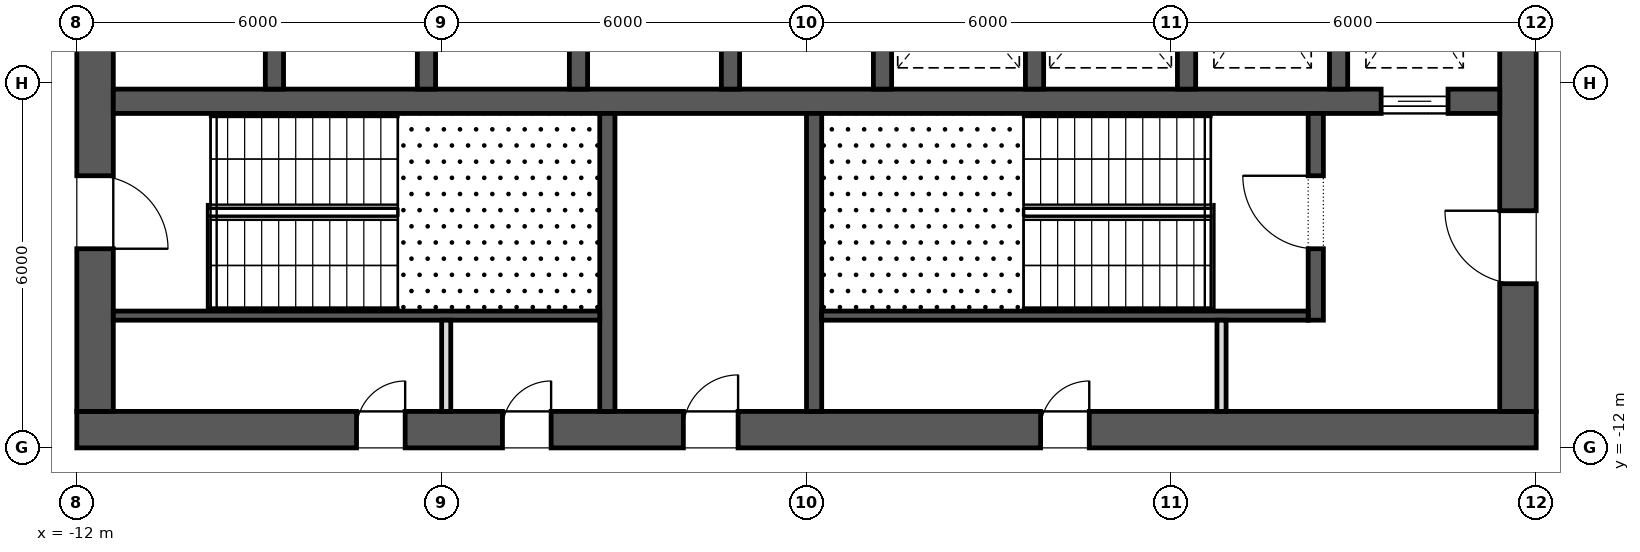
"""IFC4 building model, lengths in metres.
Left out: names, types, materials, properties, quantities, classifications, styles, units other than length and angle.
Written with IfcOpenShell. Run it as: python <this file> out.ifc"""

import sys

from ifc_helpers import new_model, si_unit, direction, frame, frame_2d, origin, place, context, subcontext, project, spatial, rectangle, extrude, element, fill, save


model = new_model("IFC4")
c1 = context("Model", 3, precision=1e-05, world=origin(), true_north=direction((0.0, 1.0)))
c2 = subcontext(c1, "Body", "Model", "MODEL_VIEW")
j1 = project(units=[si_unit("LENGTHUNIT", "METRE"), si_unit("PLANEANGLEUNIT", "RADIAN")], contexts=[c1])
p1 = place(None, origin())
s1 = spatial("IfcSite", under=j1, at=p1, CompositionType="ELEMENT")
p2 = place(p1, origin())
s2 = spatial("IfcBuilding", under=s1, at=p2, CompositionType="ELEMENT")
p3 = place(p2, frame((0.0, 0.0, 112.9)))
s3 = spatial("IfcBuildingStorey", under=s2, at=p3, CompositionType="ELEMENT", Elevation=112.9)
p4 = place(p3, frame((-12.0, -11.7, 0.0), z_axis=(0.0, 0.0, 1.0), x_axis=(1.0, 0.0, 0.0)))
e1 = element("IfcWall", 1, at=p4, inside=s3, PredefinedType="SHEAR", context=c2, shape_type="SweptSolid", body=[
    extrude(rectangle(XDim=24.0, YDim=0.6, at=frame_2d((12.0, 0.0))), origin(), (0.0, 0.0, 1.0), 4.2),
])
p5 = place(p4, frame((9.975, 0.0, 0.0)))
e2 = element("IfcOpeningElement", 2, at=p5, cuts=e1, PredefinedType="OPENING", context=c2, shape_type="SweptSolid", body=[
    extrude(rectangle(XDim=0.9, YDim=2.1, at=frame_2d((0.45, 1.05))), frame((0.0, 0.312, 0.0), z_axis=(0.0, -1.0, 0.0), x_axis=(1.0, 0.0, 0.0)), (0.0, 0.0, 1.0), 0.624),
])
p6 = place(p4, frame((4.6, 0.0, 0.0)))
e3 = element("IfcOpeningElement", 3, at=p6, cuts=e1, PredefinedType="OPENING", context=c2, shape_type="SweptSolid", body=[
    extrude(rectangle(XDim=0.8, YDim=2.1, at=frame_2d((0.4, 1.05))), frame((0.0, 0.312, 0.0), z_axis=(0.0, -1.0, 0.0), x_axis=(1.0, 0.0, 0.0)), (0.0, 0.0, 1.0), 0.624),
])
p7 = place(p4, frame((7.0, 0.0, 0.0)))
e4 = element("IfcOpeningElement", 4, at=p7, cuts=e1, PredefinedType="OPENING", context=c2, shape_type="SweptSolid", body=[
    extrude(rectangle(XDim=0.8, YDim=2.1, at=frame_2d((0.4, 1.05))), frame((0.0, 0.312, 0.0), z_axis=(0.0, -1.0, 0.0), x_axis=(1.0, 0.0, 0.0)), (0.0, 0.0, 1.0), 0.624),
])
p8 = place(p4, frame((15.85, 0.0, 0.0)))
e5 = element("IfcOpeningElement", 5, at=p8, cuts=e1, PredefinedType="OPENING", context=c2, shape_type="SweptSolid", body=[
    extrude(rectangle(XDim=0.8, YDim=2.1, at=frame_2d((0.4, 1.05))), frame((0.0, 0.312, 0.0), z_axis=(0.0, -1.0, 0.0), x_axis=(1.0, 0.0, 0.0)), (0.0, 0.0, 1.0), 0.624),
])
p9 = place(p3, frame((11.7, -11.4, 0.0), z_axis=(0.0, 0.0, 1.0), x_axis=(0.0, 1.0, 0.0)))
e6 = element("IfcWall", 6, at=p9, inside=s3, PredefinedType="SHEAR", context=c2, shape_type="SweptSolid", body=[
    extrude(rectangle(XDim=22.8, YDim=0.6, at=frame_2d((11.4, 0.0))), origin(), (0.0, 0.0, 1.0), 4.2),
])
p10 = place(p9, frame((10.2, 0.0, 0.0)))
e7 = element("IfcOpeningElement", 7, at=p10, cuts=e6, PredefinedType="OPENING", context=c2, shape_type="SweptSolid", body=[
    extrude(rectangle(XDim=2.4, YDim=2.1, at=frame_2d((1.2, 1.05))), frame((0.0, 0.312, 0.0), z_axis=(0.0, -1.0, 0.0), x_axis=(1.0, 0.0, 0.0)), (0.0, 0.0, 1.0), 0.624),
])
p11 = place(p9, frame((19.5, 0.0, 0.0)))
e8 = element("IfcOpeningElement", 8, at=p11, cuts=e6, PredefinedType="OPENING", context=c2, shape_type="SweptSolid", body=[
    extrude(rectangle(XDim=1.2, YDim=2.1, at=frame_2d((0.6, 1.05))), frame((0.0, 0.312, 0.0), z_axis=(0.0, -1.0, 0.0), x_axis=(1.0, 0.0, 0.0)), (0.0, 0.0, 1.0), 0.624),
])
p12 = place(p9, frame((2.1, 0.0, 0.0)))
e9 = element("IfcOpeningElement", 9, at=p12, cuts=e6, PredefinedType="OPENING", context=c2, shape_type="SweptSolid", body=[
    extrude(rectangle(XDim=1.2, YDim=2.1, at=frame_2d((0.6, 1.05))), frame((0.0, 0.312, 0.0), z_axis=(0.0, -1.0, 0.0), x_axis=(1.0, 0.0, 0.0)), (0.0, 0.0, 1.0), 0.624),
])
p13 = place(p3, frame((-11.7, -11.4, 0.0), z_axis=(0.0, 0.0, 1.0), x_axis=(0.0, 1.0, 0.0)))
e10 = element("IfcWall", 10, at=p13, inside=s3, PredefinedType="SHEAR", context=c2, shape_type="SweptSolid", body=[
    extrude(rectangle(XDim=22.8, YDim=0.6, at=frame_2d((11.4, 0.0))), origin(), (0.0, 0.0, 1.0), 4.2),
])
p14 = place(p13, frame((10.2, 0.0, 0.0)))
e11 = element("IfcOpeningElement", 11, at=p14, cuts=e10, PredefinedType="OPENING", context=c2, shape_type="SweptSolid", body=[
    extrude(rectangle(XDim=2.4, YDim=2.1, at=frame_2d((1.2, 1.05))), frame((0.0, 0.312, 0.0), z_axis=(0.0, -1.0, 0.0), x_axis=(1.0, 0.0, 0.0)), (0.0, 0.0, 1.0), 0.624),
])
p15 = place(p13, frame((18.925, 0.0, 0.0)))
e12 = element("IfcOpeningElement", 12, at=p15, cuts=e10, PredefinedType="OPENING", context=c2, shape_type="SweptSolid", body=[
    extrude(rectangle(XDim=1.2, YDim=2.1, at=frame_2d((0.6, 1.05))), frame((0.0, 0.312, 0.0), z_axis=(0.0, -1.0, 0.0), x_axis=(1.0, 0.0, 0.0)), (0.0, 0.0, 1.0), 0.624),
])
p16 = place(p13, frame((2.675, 0.0, 0.0)))
e13 = element("IfcOpeningElement", 13, at=p16, cuts=e10, PredefinedType="OPENING", context=c2, shape_type="SweptSolid", body=[
    extrude(rectangle(XDim=1.2, YDim=2.1, at=frame_2d((0.6, 1.05))), frame((0.0, 0.312, 0.0), z_axis=(0.0, -1.0, 0.0), x_axis=(1.0, 0.0, 0.0)), (0.0, 0.0, 1.0), 0.624),
])
p17 = place(p3, frame((-11.4, -6.3, 0.0), z_axis=(0.0, 0.0, 1.0), x_axis=(1.0, 0.0, 0.0)))
e14 = element("IfcWall", 14, at=p17, inside=s3, PredefinedType="SHEAR", context=c2, shape_type="SweptSolid", body=[
    extrude(rectangle(XDim=22.8, YDim=0.4, at=frame_2d((11.4, 0.0))), origin(), (0.0, 0.0, 1.0), 4.2),
])
p18 = place(p17, frame((20.85, 0.0, 0.0)))
e15 = element("IfcOpeningElement", 15, at=p18, cuts=e14, PredefinedType="OPENING", context=c2, shape_type="SweptSolid", body=[
    extrude(rectangle(XDim=1.1, YDim=2.1, at=frame_2d((0.55, 1.05))), frame((0.0, 0.212, 0.0), z_axis=(0.0, -1.0, 0.0), x_axis=(1.0, 0.0, 0.0)), (0.0, 0.0, 1.0), 0.424),
])
for number, where, z_axis, x_axis in (
    (16, (-8.75, -6.1, 0.0), (0.0, 0.0, 1.0), (0.0, 1.0, 0.0)),
    (17, (-6.25, -6.1, 0.0), (0.0, 0.0, 1.0), (0.0, 1.0, 0.0)),
    (18, (-3.75, -6.1, 0.0), (0.0, 0.0, 1.0), (0.0, 1.0, 0.0)),
    (19, (-1.25, -6.1, 0.0), (0.0, 0.0, 1.0), (0.0, 1.0, 0.0)),
    (20, (1.25, -6.1, 0.0), (0.0, 0.0, 1.0), (0.0, 1.0, 0.0)),
    (21, (3.75, -6.1, 0.0), (0.0, 0.0, 1.0), (0.0, 1.0, 0.0)),
    (22, (6.25, -6.1, 0.0), (0.0, 0.0, 1.0), (0.0, 1.0, 0.0)),
    (23, (8.75, -6.1, 0.0), (0.0, 0.0, 1.0), (0.0, 1.0, 0.0)),
):
    element("IfcWall", number, at=place(p3, frame(where, z_axis=z_axis, x_axis=x_axis)), inside=s3, PredefinedType="SHEAR", context=c2, shape_type="SweptSolid", body=[
        extrude(rectangle(XDim=2.9, YDim=0.3, at=frame_2d((1.45, 0.0))), origin(), (0.0, 0.0, 1.0), 4.2),
    ])
for number, where, z_axis, x_axis in (
    (24, (-3.275, -11.4, 0.0), (0.0, 0.0, 1.0), (0.0, 1.0, 0.0)),
    (25, (0.125, -11.4, 0.0), (0.0, 0.0, 1.0), (0.0, 1.0, 0.0)),
):
    element("IfcWall", number, at=place(p3, frame(where, z_axis=z_axis, x_axis=x_axis)), inside=s3, PredefinedType="SHEAR", context=c2, shape_type="SweptSolid", body=[
        extrude(rectangle(XDim=4.9, YDim=0.25, at=frame_2d((2.45, 0.0))), origin(), (0.0, 0.0, 1.0), 3.9),
    ])
p19 = place(p3, frame((8.375, -9.9, 0.0), z_axis=(0.0, 0.0, 1.0), x_axis=(0.0, 1.0, 0.0)))
e26 = element("IfcWall", 26, at=p19, inside=s3, PredefinedType="SHEAR", context=c2, shape_type="SweptSolid", body=[
    extrude(rectangle(XDim=3.4, YDim=0.25, at=frame_2d((1.7, 0.0))), origin(), (0.0, 0.0, 1.0), 3.9),
])
p20 = place(p19, frame((1.175, 0.0, 0.0)))
e27 = element("IfcOpeningElement", 27, at=p20, cuts=e26, PredefinedType="OPENING", context=c2, shape_type="SweptSolid", body=[
    extrude(rectangle(XDim=1.2, YDim=2.1, at=frame_2d((0.6, 1.05))), frame((0.0, 0.137, 0.0), z_axis=(0.0, -1.0, 0.0), x_axis=(1.0, 0.0, 0.0)), (0.0, 0.0, 1.0), 0.274),
])
for number, where, z_axis, x_axis in (
    (28, (-11.4, -9.825, 0.0), (0.0, 0.0, 1.0), (1.0, 0.0, 0.0)),
    (29, (0.25, -9.825, 0.0), (0.0, 0.0, 1.0), (1.0, 0.0, 0.0)),
):
    element("IfcWall", number, at=place(p3, frame(where, z_axis=z_axis, x_axis=x_axis)), inside=s3, PredefinedType="SHEAR", context=c2, shape_type="SweptSolid", body=[
        extrude(rectangle(XDim=8.0, YDim=0.15, at=frame_2d((4.0, 0.0))), origin(), (0.0, 0.0, 1.0), 3.9),
    ])
for number, where, z_axis, x_axis in (
    (30, (-5.925, -11.4, 0.0), (0.0, 0.0, 1.0), (0.0, 1.0, 0.0)),
    (31, (6.825, -11.4, 0.0), (0.0, 0.0, 1.0), (0.0, 1.0, 0.0)),
):
    element("IfcWall", number, at=place(p3, frame(where, z_axis=z_axis, x_axis=x_axis)), inside=s3, PredefinedType="PARTITIONING", context=c2, shape_type="SweptSolid", body=[
        extrude(rectangle(XDim=1.5, YDim=0.15, at=frame_2d((0.75, 0.0))), origin(), (0.0, 0.0, 1.0), 3.9),
    ])
p21 = place(p18, origin())
e32 = element("IfcDoor", 32, at=p21, inside=s3, OperationType="SLIDING_TO_LEFT", PredefinedType="DOOR", context=c2, shape_type="SweptSolid", body=[
    extrude(rectangle(XDim=1.1, YDim=2.1, at=frame_2d((0.55, 1.05))), frame((0.0, 0.025, 0.0), z_axis=(0.0, -1.0, 0.0), x_axis=(1.0, 0.0, 0.0)), (0.0, 0.0, 1.0), 0.05),
])
fill(e15, e32)
p22 = place(p16, frame((1.2, 0.0, 0.0), z_axis=(0.0, 0.0, 1.0), x_axis=(-1.0, 0.0, 0.0)))
e33 = element("IfcDoor", 33, at=p22, inside=s3, OperationType="SINGLE_SWING_LEFT", PredefinedType="DOOR", context=c2, shape_type="SweptSolid", body=[
    extrude(rectangle(XDim=1.2, YDim=2.1, at=frame_2d((0.6, 1.05))), frame((0.0, 0.025, 0.0), z_axis=(0.0, -1.0, 0.0), x_axis=(1.0, 0.0, 0.0)), (0.0, 0.0, 1.0), 0.05),
])
fill(e13, e33)
p23 = place(p20, origin())
e34 = element("IfcDoor", 34, at=p23, inside=s3, OperationType="SINGLE_SWING_LEFT", PredefinedType="DOOR", context=c2, shape_type="SweptSolid", body=[
    extrude(rectangle(XDim=1.2, YDim=2.1, at=frame_2d((0.6, 1.05))), frame((0.0, 0.025, 0.0), z_axis=(0.0, -1.0, 0.0), x_axis=(1.0, 0.0, 0.0)), (0.0, 0.0, 1.0), 0.05),
])
fill(e27, e34)
p24 = place(p12, origin())
e35 = element("IfcDoor", 35, at=p24, inside=s3, OperationType="SINGLE_SWING_LEFT", PredefinedType="DOOR", context=c2, shape_type="SweptSolid", body=[
    extrude(rectangle(XDim=1.2, YDim=2.1, at=frame_2d((0.6, 1.05))), frame((0.0, 0.025, 0.0), z_axis=(0.0, -1.0, 0.0), x_axis=(1.0, 0.0, 0.0)), (0.0, 0.0, 1.0), 0.05),
])
fill(e9, e35)
p25 = place(p5, origin())
e36 = element("IfcDoor", 36, at=p25, inside=s3, OperationType="SINGLE_SWING_LEFT", PredefinedType="DOOR", context=c2, shape_type="SweptSolid", body=[
    extrude(rectangle(XDim=0.9, YDim=2.1, at=frame_2d((0.45, 1.05))), frame((0.0, 0.025, 0.0), z_axis=(0.0, -1.0, 0.0), x_axis=(1.0, 0.0, 0.0)), (0.0, 0.0, 1.0), 0.05),
])
fill(e2, e36)
p26 = place(p6, origin())
e37 = element("IfcDoor", 37, at=p26, inside=s3, OperationType="SINGLE_SWING_LEFT", PredefinedType="DOOR", context=c2, shape_type="SweptSolid", body=[
    extrude(rectangle(XDim=0.8, YDim=2.1, at=frame_2d((0.4, 1.05))), frame((0.0, 0.025, 0.0), z_axis=(0.0, -1.0, 0.0), x_axis=(1.0, 0.0, 0.0)), (0.0, 0.0, 1.0), 0.05),
])
fill(e3, e37)
p27 = place(p7, origin())
e38 = element("IfcDoor", 38, at=p27, inside=s3, OperationType="SINGLE_SWING_LEFT", PredefinedType="DOOR", context=c2, shape_type="SweptSolid", body=[
    extrude(rectangle(XDim=0.8, YDim=2.1, at=frame_2d((0.4, 1.05))), frame((0.0, 0.025, 0.0), z_axis=(0.0, -1.0, 0.0), x_axis=(1.0, 0.0, 0.0)), (0.0, 0.0, 1.0), 0.05),
])
fill(e4, e38)
p28 = place(p8, origin())
e39 = element("IfcDoor", 39, at=p28, inside=s3, OperationType="SINGLE_SWING_LEFT", PredefinedType="DOOR", context=c2, shape_type="SweptSolid", body=[
    extrude(rectangle(XDim=0.8, YDim=2.1, at=frame_2d((0.4, 1.05))), frame((0.0, 0.025, 0.0), z_axis=(0.0, -1.0, 0.0), x_axis=(1.0, 0.0, 0.0)), (0.0, 0.0, 1.0), 0.05),
])
fill(e5, e39)
save(model, sys.argv[1])
